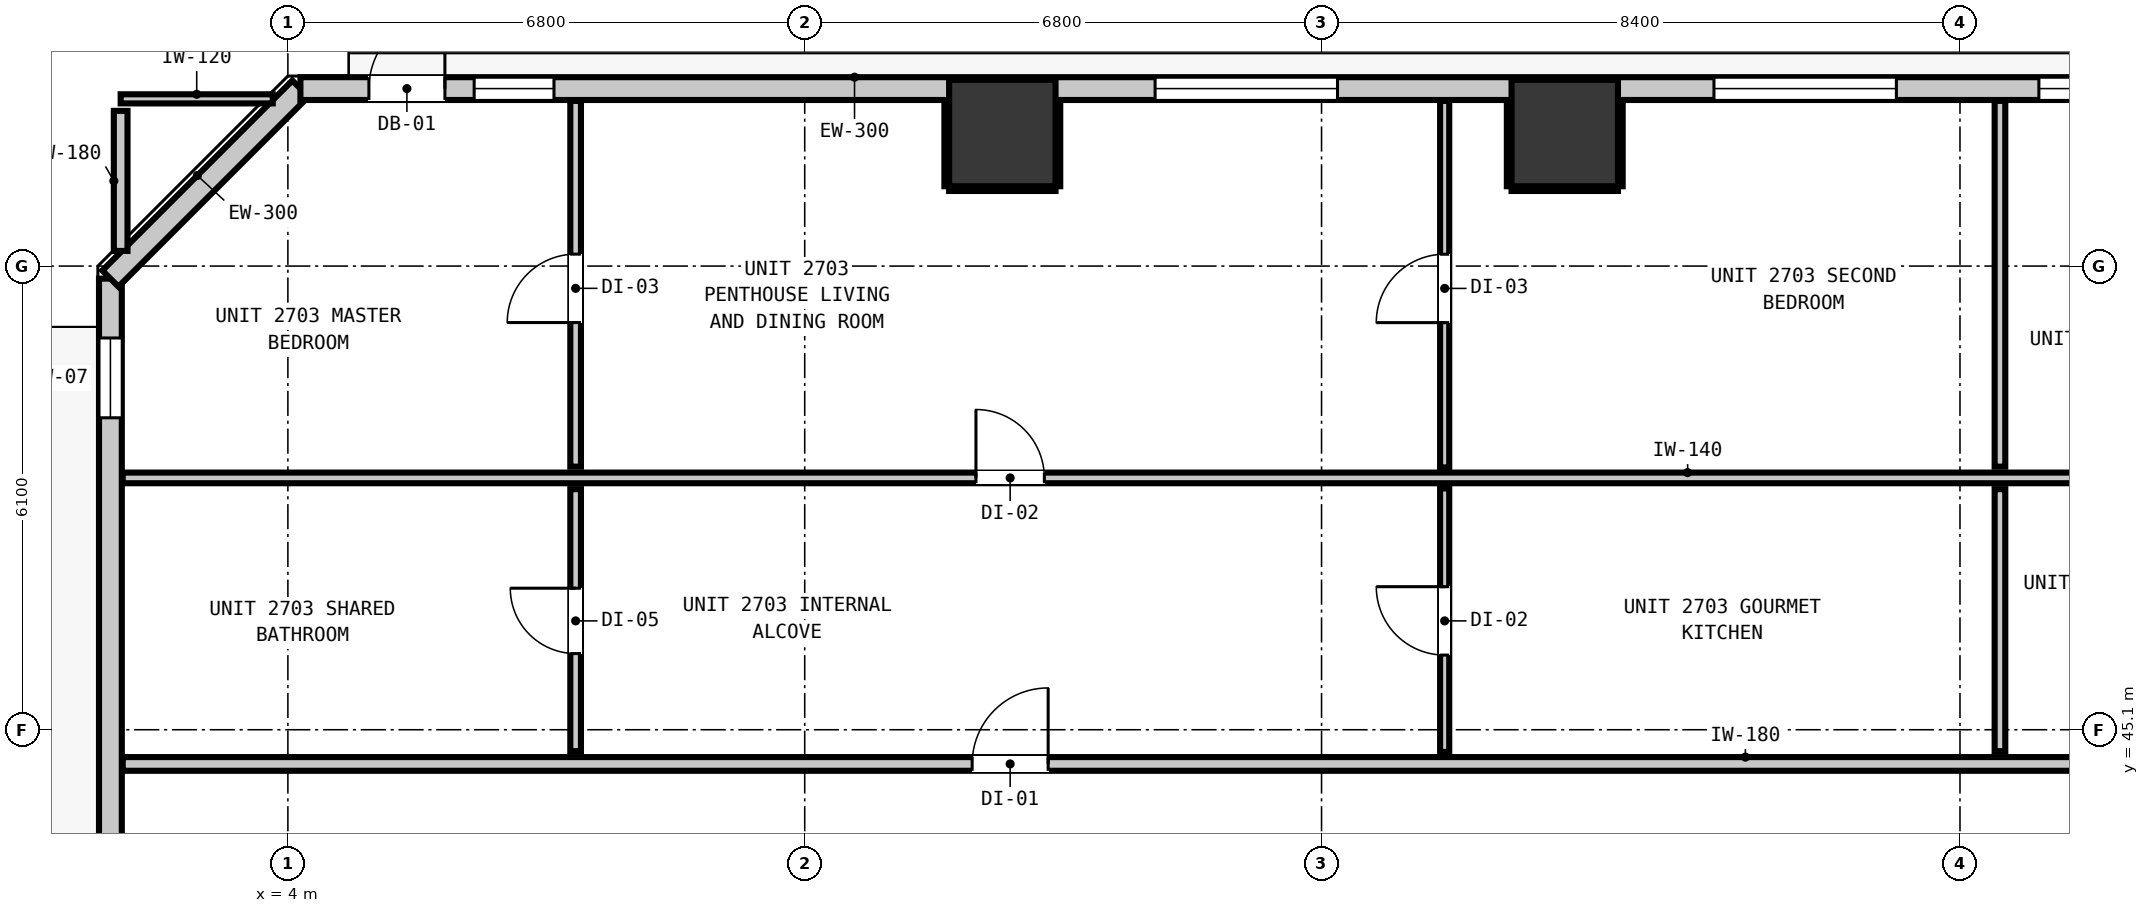
"""IFC4 building model, lengths in metres.
Left out: names, types, materials, properties, quantities, classifications, styles, units other than length and angle.
Written with IfcOpenShell. Run it as: python <this file> out.ifc"""

import sys

from ifc_helpers import new_model, si_unit, direction, frame, frame_2d, origin, origin_2d, place, context, subcontext, project, spatial, rectangle, extrude, element, fill, save


model = new_model("IFC4")
c1 = context("Model", 3, precision=1e-05, world=origin(), true_north=direction((0.0, 1.0)))
c2 = subcontext(c1, "Body", "Model", "MODEL_VIEW")
j1 = project(units=[si_unit("LENGTHUNIT", "METRE"), si_unit("PLANEANGLEUNIT", "RADIAN")], contexts=[c1])
p1 = place(None, origin())
s1 = spatial("IfcSite", under=j1, at=p1, CompositionType="ELEMENT")
p2 = place(p1, origin())
s2 = spatial("IfcBuilding", under=s1, at=p2, CompositionType="ELEMENT")
p3 = place(p2, frame((0.0, 0.0, 96.12)))
s3 = spatial("IfcBuildingStorey", under=s2, at=p3, CompositionType="ELEMENT", Elevation=96.12)
for number, where, z_axis, x_axis in (
    (1, (13.4, 52.95, 0.0), (0.0, 0.0, 1.0), (1.0, 0.0, 0.0)),
    (2, (20.8, 52.95, 0.0), (0.0, 0.0, 1.0), (1.0, 0.0, 0.0)),
):
    element("IfcColumn", number, at=place(p3, frame(where, z_axis=z_axis, x_axis=x_axis)), inside=s3, PredefinedType="COLUMN", context=c2, shape_type="SweptSolid", body=[
        extrude(rectangle(XDim=1.4, YDim=1.4, at=origin_2d()), origin(), (0.0, 0.0, 1.0), 3.32),
    ])
p4 = place(p3, frame((1.665, 16.365, 0.0), z_axis=(0.0, 0.0, 1.0), x_axis=(0.0, 1.0, 0.0)))
e3 = element("IfcWall", 3, at=p4, inside=s3, PredefinedType="STANDARD", context=c2, shape_type="SweptSolid", body=[
    extrude(rectangle(XDim=34.67, YDim=0.3, at=frame_2d((17.335, 0.0))), origin(), (0.0, 0.0, 1.0), 3.06),
])
p5 = place(p4, frame((6.854, 0.0, 0.0)))
e4 = element("IfcOpeningElement", 4, at=p5, cuts=e3, PredefinedType="OPENING", context=c2, shape_type="SweptSolid", body=[
    extrude(rectangle(XDim=1.0, YDim=2.15, at=frame_2d((0.5, 1.075))), frame((0.0, 0.16, 0.0), z_axis=(0.0, -1.0, 0.0), x_axis=(1.0, 0.0, 0.0)), (0.0, 0.0, 1.0), 0.32),
])
p6 = place(p4, frame((32.839, 0.0, 0.85)))
e5 = element("IfcOpeningElement", 5, at=p6, cuts=e3, PredefinedType="OPENING", context=c2, shape_type="SweptSolid", body=[
    extrude(rectangle(XDim=1.05, YDim=1.65, at=frame_2d((0.525, 0.825))), frame((0.0, 0.16, 0.0), z_axis=(0.0, -1.0, 0.0), x_axis=(1.0, 0.0, 0.0)), (0.0, 0.0, 1.0), 0.32),
])
p7 = place(p4, frame((10.044, 0.0, 0.85)))
e6 = element("IfcOpeningElement", 6, at=p7, cuts=e3, PredefinedType="OPENING", context=c2, shape_type="SweptSolid", body=[
    extrude(rectangle(XDim=2.4, YDim=1.95, at=frame_2d((1.2, 0.975))), frame((0.0, 0.16, 0.0), z_axis=(0.0, -1.0, 0.0), x_axis=(1.0, 0.0, 0.0)), (0.0, 0.0, 1.0), 0.32),
])
p8 = place(p4, frame((19.145, 0.0, 0.85)))
e7 = element("IfcOpeningElement", 7, at=p8, cuts=e3, PredefinedType="OPENING", context=c2, shape_type="SweptSolid", body=[
    extrude(rectangle(XDim=2.4, YDim=1.95, at=frame_2d((1.2, 0.975))), frame((0.0, 0.16, 0.0), z_axis=(0.0, -1.0, 0.0), x_axis=(1.0, 0.0, 0.0)), (0.0, 0.0, 1.0), 0.32),
])
p9 = place(p3, frame((1.665, 51.035, 0.0), z_axis=(0.0, 0.0, 1.0), x_axis=(0.707106781187, 0.707106781187, 0.0)))
e8 = element("IfcWall", 8, at=p9, inside=s3, PredefinedType="STANDARD", context=c2, shape_type="SweptSolid", body=[
    extrude(rectangle(XDim=3.536, YDim=0.3, at=frame_2d((1.768, 0.0))), origin(), (0.0, 0.0, 1.0), 3.06),
])
p10 = place(p3, frame((4.165, 53.535, 0.0), z_axis=(0.0, 0.0, 1.0), x_axis=(1.0, 0.0, 0.0)))
e9 = element("IfcWall", 9, at=p10, inside=s3, PredefinedType="STANDARD", context=c2, shape_type="SweptSolid", body=[
    extrude(rectangle(XDim=37.47, YDim=0.3, at=frame_2d((18.735, 0.0))), origin(), (0.0, 0.0, 1.0), 3.06),
])
p11 = place(p10, frame((0.901, 0.0, 0.0)))
e10 = element("IfcOpeningElement", 10, at=p11, cuts=e9, PredefinedType="OPENING", context=c2, shape_type="SweptSolid", body=[
    extrude(rectangle(XDim=1.0, YDim=2.15, at=frame_2d((0.5, 1.075))), frame((0.0, 0.16, 0.0), z_axis=(0.0, -1.0, 0.0), x_axis=(1.0, 0.0, 0.0)), (0.0, 0.0, 1.0), 0.32),
])
p12 = place(p10, frame((11.245, 0.0, 0.85)))
e11 = element("IfcOpeningElement", 11, at=p12, cuts=e9, PredefinedType="OPENING", context=c2, shape_type="SweptSolid", body=[
    extrude(rectangle(XDim=2.4, YDim=1.95, at=frame_2d((1.2, 0.975))), frame((0.0, 0.16, 0.0), z_axis=(0.0, -1.0, 0.0), x_axis=(1.0, 0.0, 0.0)), (0.0, 0.0, 1.0), 0.32),
])
p13 = place(p10, frame((2.286, 0.0, 0.85)))
e12 = element("IfcOpeningElement", 12, at=p13, cuts=e9, PredefinedType="OPENING", context=c2, shape_type="SweptSolid", body=[
    extrude(rectangle(XDim=1.05, YDim=1.65, at=frame_2d((0.525, 0.825))), frame((0.0, 0.16, 0.0), z_axis=(0.0, -1.0, 0.0), x_axis=(1.0, 0.0, 0.0)), (0.0, 0.0, 1.0), 0.32),
])
p14 = place(p10, frame((18.598, 0.0, 0.85)))
e13 = element("IfcOpeningElement", 13, at=p14, cuts=e9, PredefinedType="OPENING", context=c2, shape_type="SweptSolid", body=[
    extrude(rectangle(XDim=2.4, YDim=1.95, at=frame_2d((1.2, 0.975))), frame((0.0, 0.16, 0.0), z_axis=(0.0, -1.0, 0.0), x_axis=(1.0, 0.0, 0.0)), (0.0, 0.0, 1.0), 0.32),
])
p15 = place(p10, frame((27.485, 0.0, 0.85)))
e14 = element("IfcOpeningElement", 14, at=p15, cuts=e9, PredefinedType="OPENING", context=c2, shape_type="SweptSolid", body=[
    extrude(rectangle(XDim=2.4, YDim=1.95, at=frame_2d((1.2, 0.975))), frame((0.0, 0.16, 0.0), z_axis=(0.0, -1.0, 0.0), x_axis=(1.0, 0.0, 0.0)), (0.0, 0.0, 1.0), 0.32),
])
p16 = place(p10, frame((22.873, 0.0, 0.85)))
e15 = element("IfcOpeningElement", 15, at=p16, cuts=e9, PredefinedType="OPENING", context=c2, shape_type="SweptSolid", body=[
    extrude(rectangle(XDim=1.05, YDim=1.65, at=frame_2d((0.525, 0.825))), frame((0.0, 0.16, 0.0), z_axis=(0.0, -1.0, 0.0), x_axis=(1.0, 0.0, 0.0)), (0.0, 0.0, 1.0), 0.32),
])
p17 = place(p10, frame((33.863, 0.0, 0.85)))
e16 = element("IfcOpeningElement", 16, at=p17, cuts=e9, PredefinedType="OPENING", context=c2, shape_type="SweptSolid", body=[
    extrude(rectangle(XDim=1.05, YDim=1.65, at=frame_2d((0.525, 0.825))), frame((0.0, 0.16, 0.0), z_axis=(0.0, -1.0, 0.0), x_axis=(1.0, 0.0, 0.0)), (0.0, 0.0, 1.0), 0.32),
])
p18 = place(p10, frame((36.135, 0.0, 0.85)))
e17 = element("IfcOpeningElement", 17, at=p18, cuts=e9, PredefinedType="OPENING", context=c2, shape_type="SweptSolid", body=[
    extrude(rectangle(XDim=1.05, YDim=1.65, at=frame_2d((0.525, 0.825))), frame((0.0, 0.16, 0.0), z_axis=(0.0, -1.0, 0.0), x_axis=(1.0, 0.0, 0.0)), (0.0, 0.0, 1.0), 0.32),
])
p19 = place(p3, frame((1.827, 44.65, 0.0), z_axis=(0.0, 0.0, 1.0), x_axis=(1.0, 0.0, 0.0)))
e18 = element("IfcWall", 18, at=p19, inside=s3, PredefinedType="PARTITIONING", context=c2, shape_type="SweptSolid", body=[
    extrude(rectangle(XDim=42.146, YDim=0.18, at=frame_2d((21.073, 0.0))), origin(), (0.0, 0.0, 1.0), 3.06),
])
p20 = place(p19, frame((11.176, 0.0, 0.0)))
e19 = element("IfcOpeningElement", 19, at=p20, cuts=e18, PredefinedType="OPENING", context=c2, shape_type="SweptSolid", body=[
    extrude(rectangle(XDim=1.0, YDim=2.15, at=frame_2d((0.5, 1.075))), frame((0.0, 0.1, 0.0), z_axis=(0.0, -1.0, 0.0), x_axis=(1.0, 0.0, 0.0)), (0.0, 0.0, 1.0), 0.2),
])
p21 = place(p19, frame((30.523, 0.0, 0.0)))
e20 = element("IfcOpeningElement", 20, at=p21, cuts=e18, PredefinedType="OPENING", context=c2, shape_type="SweptSolid", body=[
    extrude(rectangle(XDim=1.0, YDim=2.15, at=frame_2d((0.5, 1.075))), frame((0.0, 0.1, 0.0), z_axis=(0.0, -1.0, 0.0), x_axis=(1.0, 0.0, 0.0)), (0.0, 0.0, 1.0), 0.2),
])
p22 = place(p3, frame((1.827, 48.413, 0.0), z_axis=(0.0, 0.0, 1.0), x_axis=(1.0, 0.0, 0.0)))
e21 = element("IfcWall", 21, at=p22, inside=s3, PredefinedType="PARTITIONING", context=c2, shape_type="SweptSolid", body=[
    extrude(rectangle(XDim=28.953, YDim=0.14, at=frame_2d((14.477, 0.0))), origin(), (0.0, 0.0, 1.0), 3.06),
])
p23 = place(p22, frame((11.226, 0.0, 0.0)))
e22 = element("IfcOpeningElement", 22, at=p23, cuts=e21, PredefinedType="OPENING", context=c2, shape_type="SweptSolid", body=[
    extrude(rectangle(XDim=0.9, YDim=2.1, at=frame_2d((0.45, 1.05))), frame((0.0, 0.08, 0.0), z_axis=(0.0, -1.0, 0.0), x_axis=(1.0, 0.0, 0.0)), (0.0, 0.0, 1.0), 0.16),
])
p24 = place(p3, frame((1.8, 53.4, 0.0), z_axis=(0.0, 0.0, 1.0), x_axis=(1.0, 0.0, 0.0)))
e23 = element("IfcWall", 23, at=p24, inside=s3, PredefinedType="PARTITIONING", context=c2, shape_type="SweptSolid", body=[
    extrude(rectangle(XDim=2.001, YDim=0.12, at=frame_2d((1.0, 0.0))), origin(), (0.0, 0.0, 1.0), 3.06),
])
p25 = place(p3, frame((1.8, 51.399, 0.0), z_axis=(0.0, 0.0, 1.0), x_axis=(0.0, 1.0, 0.0)))
e24 = element("IfcWall", 24, at=p25, inside=s3, PredefinedType="PARTITIONING", context=c2, shape_type="SweptSolid", body=[
    extrude(rectangle(XDim=1.843, YDim=0.18, at=frame_2d((0.921, 0.0))), origin(), (0.0, 0.0, 1.0), 3.06),
])
p26 = place(p3, frame((7.786, 44.818, 0.0), z_axis=(0.0, 0.0, 1.0), x_axis=(0.0, 1.0, 0.0)))
e25 = element("IfcWall", 25, at=p26, inside=s3, PredefinedType="PARTITIONING", context=c2, shape_type="SweptSolid", body=[
    extrude(rectangle(XDim=3.447, YDim=0.14, at=frame_2d((1.723, 0.0))), origin(), (0.0, 0.0, 1.0), 3.06),
])
p27 = place(p26, frame((1.284, 0.0, 0.0)))
e26 = element("IfcOpeningElement", 26, at=p27, cuts=e25, PredefinedType="OPENING", context=c2, shape_type="SweptSolid", body=[
    extrude(rectangle(XDim=0.86, YDim=2.02, at=frame_2d((0.43, 1.01))), frame((0.0, 0.08, 0.0), z_axis=(0.0, -1.0, 0.0), x_axis=(1.0, 0.0, 0.0)), (0.0, 0.0, 1.0), 0.16),
])
p28 = place(p3, frame((7.786, 48.561, 0.0), z_axis=(0.0, 0.0, 1.0), x_axis=(0.0, 1.0, 0.0)))
e27 = element("IfcWall", 27, at=p28, inside=s3, PredefinedType="PARTITIONING", context=c2, shape_type="SweptSolid", body=[
    extrude(rectangle(XDim=4.812, YDim=0.14, at=frame_2d((2.406, 0.0))), origin(), (0.0, 0.0, 1.0), 3.06),
])
p29 = place(p28, frame((1.896, 0.0, 0.0)))
e28 = element("IfcOpeningElement", 28, at=p29, cuts=e27, PredefinedType="OPENING", context=c2, shape_type="SweptSolid", body=[
    extrude(rectangle(XDim=0.9, YDim=2.1, at=frame_2d((0.45, 1.05))), frame((0.0, 0.08, 0.0), z_axis=(0.0, -1.0, 0.0), x_axis=(1.0, 0.0, 0.0)), (0.0, 0.0, 1.0), 0.16),
])
p30 = place(p3, frame((26.526, 44.818, 0.0), z_axis=(0.0, 0.0, 1.0), x_axis=(0.0, 1.0, 0.0)))
e29 = element("IfcWall", 29, at=p30, inside=s3, PredefinedType="PARTITIONING", context=c2, shape_type="SweptSolid", body=[
    extrude(rectangle(XDim=3.447, YDim=0.14, at=frame_2d((1.723, 0.0))), origin(), (0.0, 0.0, 1.0), 3.06),
])
p31 = place(p3, frame((26.526, 48.561, 0.0), z_axis=(0.0, 0.0, 1.0), x_axis=(0.0, 1.0, 0.0)))
e30 = element("IfcWall", 30, at=p31, inside=s3, PredefinedType="PARTITIONING", context=c2, shape_type="SweptSolid", body=[
    extrude(rectangle(XDim=4.812, YDim=0.14, at=frame_2d((2.406, 0.0))), origin(), (0.0, 0.0, 1.0), 3.06),
])
p32 = place(p3, frame((19.22, 44.808, 0.0), z_axis=(0.0, 0.0, 1.0), x_axis=(0.0, 1.0, 0.0)))
e31 = element("IfcWall", 31, at=p32, inside=s3, PredefinedType="PARTITIONING", context=c2, shape_type="SweptSolid", body=[
    extrude(rectangle(XDim=3.467, YDim=0.12, at=frame_2d((1.733, 0.0))), origin(), (0.0, 0.0, 1.0), 3.06),
])
p33 = place(p32, frame((1.274, 0.0, 0.0)))
e32 = element("IfcOpeningElement", 32, at=p33, cuts=e31, PredefinedType="OPENING", context=c2, shape_type="SweptSolid", body=[
    extrude(rectangle(XDim=0.9, YDim=2.1, at=frame_2d((0.45, 1.05))), frame((0.0, 0.07, 0.0), z_axis=(0.0, -1.0, 0.0), x_axis=(1.0, 0.0, 0.0)), (0.0, 0.0, 1.0), 0.14),
])
p34 = place(p3, frame((19.22, 48.551, 0.0), z_axis=(0.0, 0.0, 1.0), x_axis=(0.0, 1.0, 0.0)))
e33 = element("IfcWall", 33, at=p34, inside=s3, PredefinedType="PARTITIONING", context=c2, shape_type="SweptSolid", body=[
    extrude(rectangle(XDim=4.822, YDim=0.12, at=frame_2d((2.411, 0.0))), origin(), (0.0, 0.0, 1.0), 3.06),
])
p35 = place(p34, frame((1.905, 0.0, 0.0)))
e34 = element("IfcOpeningElement", 34, at=p35, cuts=e33, PredefinedType="OPENING", context=c2, shape_type="SweptSolid", body=[
    extrude(rectangle(XDim=0.9, YDim=2.1, at=frame_2d((0.45, 1.05))), frame((0.0, 0.07, 0.0), z_axis=(0.0, -1.0, 0.0), x_axis=(1.0, 0.0, 0.0)), (0.0, 0.0, 1.0), 0.14),
])
p36 = place(p3, frame((12.7, 52.218, 0.0), z_axis=(0.0, 0.0, 1.0), x_axis=(1.0, 0.0, 0.0)))
e35 = element("IfcWall", 35, at=p36, inside=s3, PredefinedType="PARTITIONING", context=c2, shape_type="SweptSolid", body=[
    extrude(rectangle(XDim=1.4, YDim=0.06, at=frame_2d((0.7, 0.0))), origin(), (0.0, 0.0, 1.0), 1.45),
])
for number, where, z_axis, x_axis in (
    (36, (12.668, 52.25, 0.0), (0.0, 0.0, 1.0), (0.0, 1.0, 0.0)),
    (37, (14.132, 52.25, 0.0), (0.0, 0.0, 1.0), (0.0, 1.0, 0.0)),
):
    element("IfcWall", number, at=place(p3, frame(where, z_axis=z_axis, x_axis=x_axis)), inside=s3, PredefinedType="PARTITIONING", context=c2, shape_type="SweptSolid", body=[
        extrude(rectangle(XDim=1.12, YDim=0.06, at=frame_2d((0.56, 0.0))), origin(), (0.0, 0.0, 1.0), 1.45),
    ])
p37 = place(p3, frame((20.1, 52.218, 0.0), z_axis=(0.0, 0.0, 1.0), x_axis=(1.0, 0.0, 0.0)))
e38 = element("IfcWall", 38, at=p37, inside=s3, PredefinedType="PARTITIONING", context=c2, shape_type="SweptSolid", body=[
    extrude(rectangle(XDim=1.4, YDim=0.06, at=frame_2d((0.7, 0.0))), origin(), (0.0, 0.0, 1.0), 1.45),
])
for number, where, z_axis, x_axis in (
    (39, (20.068, 52.25, 0.0), (0.0, 0.0, 1.0), (0.0, 1.0, 0.0)),
    (40, (21.532, 52.25, 0.0), (0.0, 0.0, 1.0), (0.0, 1.0, 0.0)),
):
    element("IfcWall", number, at=place(p3, frame(where, z_axis=z_axis, x_axis=x_axis)), inside=s3, PredefinedType="PARTITIONING", context=c2, shape_type="SweptSolid", body=[
        extrude(rectangle(XDim=1.12, YDim=0.06, at=frame_2d((0.56, 0.0))), origin(), (0.0, 0.0, 1.0), 1.45),
    ])
p38 = place(p11, origin())
e41 = element("IfcDoor", 41, at=p38, inside=s3, OperationType="SINGLE_SWING_RIGHT", PredefinedType="DOOR", context=c2, shape_type="SweptSolid", body=[
    extrude(rectangle(XDim=1.0, YDim=2.15, at=frame_2d((0.5, 1.075))), frame((0.0, 0.025, 0.0), z_axis=(0.0, -1.0, 0.0), x_axis=(1.0, 0.0, 0.0)), (0.0, 0.0, 1.0), 0.05),
])
fill(e10, e41)
p39 = place(p6, origin())
e42 = element("IfcWindow", 42, at=p39, inside=s3, PartitioningType="SINGLE_PANEL", PredefinedType="WINDOW", context=c2, shape_type="SweptSolid", body=[
    extrude(rectangle(XDim=1.05, YDim=1.65, at=frame_2d((0.525, 0.825))), frame((0.0, 0.03, 0.0), z_axis=(0.0, -1.0, 0.0), x_axis=(1.0, 0.0, 0.0)), (0.0, 0.0, 1.0), 0.06),
])
fill(e5, e42)
p40 = place(p12, origin())
e43 = element("IfcWindow", 43, at=p40, inside=s3, PartitioningType="SINGLE_PANEL", PredefinedType="WINDOW", context=c2, shape_type="SweptSolid", body=[
    extrude(rectangle(XDim=2.4, YDim=1.95, at=frame_2d((1.2, 0.975))), frame((0.0, 0.03, 0.0), z_axis=(0.0, -1.0, 0.0), x_axis=(1.0, 0.0, 0.0)), (0.0, 0.0, 1.0), 0.06),
])
fill(e11, e43)
p41 = place(p13, origin())
e44 = element("IfcWindow", 44, at=p41, inside=s3, PartitioningType="SINGLE_PANEL", PredefinedType="WINDOW", context=c2, shape_type="SweptSolid", body=[
    extrude(rectangle(XDim=1.05, YDim=1.65, at=frame_2d((0.525, 0.825))), frame((0.0, 0.03, 0.0), z_axis=(0.0, -1.0, 0.0), x_axis=(1.0, 0.0, 0.0)), (0.0, 0.0, 1.0), 0.06),
])
fill(e12, e44)
p42 = place(p14, origin())
e45 = element("IfcWindow", 45, at=p42, inside=s3, PartitioningType="SINGLE_PANEL", PredefinedType="WINDOW", context=c2, shape_type="SweptSolid", body=[
    extrude(rectangle(XDim=2.4, YDim=1.95, at=frame_2d((1.2, 0.975))), frame((0.0, 0.03, 0.0), z_axis=(0.0, -1.0, 0.0), x_axis=(1.0, 0.0, 0.0)), (0.0, 0.0, 1.0), 0.06),
])
fill(e13, e45)
p43 = place(p16, origin())
e46 = element("IfcWindow", 46, at=p43, inside=s3, PartitioningType="SINGLE_PANEL", PredefinedType="WINDOW", context=c2, shape_type="SweptSolid", body=[
    extrude(rectangle(XDim=1.05, YDim=1.65, at=frame_2d((0.525, 0.825))), frame((0.0, 0.03, 0.0), z_axis=(0.0, -1.0, 0.0), x_axis=(1.0, 0.0, 0.0)), (0.0, 0.0, 1.0), 0.06),
])
fill(e15, e46)
p44 = place(p20, origin())
e47 = element("IfcDoor", 47, at=p44, inside=s3, OperationType="SINGLE_SWING_RIGHT", PredefinedType="DOOR", context=c2, shape_type="SweptSolid", body=[
    extrude(rectangle(XDim=1.0, YDim=2.15, at=frame_2d((0.5, 1.075))), frame((0.0, 0.025, 0.0), z_axis=(0.0, -1.0, 0.0), x_axis=(1.0, 0.0, 0.0)), (0.0, 0.0, 1.0), 0.05),
])
fill(e19, e47)
p45 = place(p23, origin())
e48 = element("IfcDoor", 48, at=p45, inside=s3, OperationType="SINGLE_SWING_LEFT", PredefinedType="DOOR", context=c2, shape_type="SweptSolid", body=[
    extrude(rectangle(XDim=0.9, YDim=2.1, at=frame_2d((0.45, 1.05))), frame((0.0, 0.025, 0.0), z_axis=(0.0, -1.0, 0.0), x_axis=(1.0, 0.0, 0.0)), (0.0, 0.0, 1.0), 0.05),
])
fill(e22, e48)
p46 = place(p27, origin())
e49 = element("IfcDoor", 49, at=p46, inside=s3, OperationType="SINGLE_SWING_RIGHT", PredefinedType="DOOR", context=c2, shape_type="SweptSolid", body=[
    extrude(rectangle(XDim=0.86, YDim=2.02, at=frame_2d((0.43, 1.01))), frame((0.0, 0.025, 0.0), z_axis=(0.0, -1.0, 0.0), x_axis=(1.0, 0.0, 0.0)), (0.0, 0.0, 1.0), 0.05),
])
fill(e26, e49)
p47 = place(p29, origin())
e50 = element("IfcDoor", 50, at=p47, inside=s3, OperationType="SINGLE_SWING_LEFT", PredefinedType="DOOR", context=c2, shape_type="SweptSolid", body=[
    extrude(rectangle(XDim=0.9, YDim=2.1, at=frame_2d((0.45, 1.05))), frame((0.0, 0.025, 0.0), z_axis=(0.0, -1.0, 0.0), x_axis=(1.0, 0.0, 0.0)), (0.0, 0.0, 1.0), 0.05),
])
fill(e28, e50)
p48 = place(p33, origin())
e51 = element("IfcDoor", 51, at=p48, inside=s3, OperationType="SINGLE_SWING_RIGHT", PredefinedType="DOOR", context=c2, shape_type="SweptSolid", body=[
    extrude(rectangle(XDim=0.9, YDim=2.1, at=frame_2d((0.45, 1.05))), frame((0.0, 0.025, 0.0), z_axis=(0.0, -1.0, 0.0), x_axis=(1.0, 0.0, 0.0)), (0.0, 0.0, 1.0), 0.05),
])
fill(e32, e51)
p49 = place(p35, origin())
e52 = element("IfcDoor", 52, at=p49, inside=s3, OperationType="SINGLE_SWING_LEFT", PredefinedType="DOOR", context=c2, shape_type="SweptSolid", body=[
    extrude(rectangle(XDim=0.9, YDim=2.1, at=frame_2d((0.45, 1.05))), frame((0.0, 0.025, 0.0), z_axis=(0.0, -1.0, 0.0), x_axis=(1.0, 0.0, 0.0)), (0.0, 0.0, 1.0), 0.05),
])
fill(e34, e52)
save(model, sys.argv[1])
